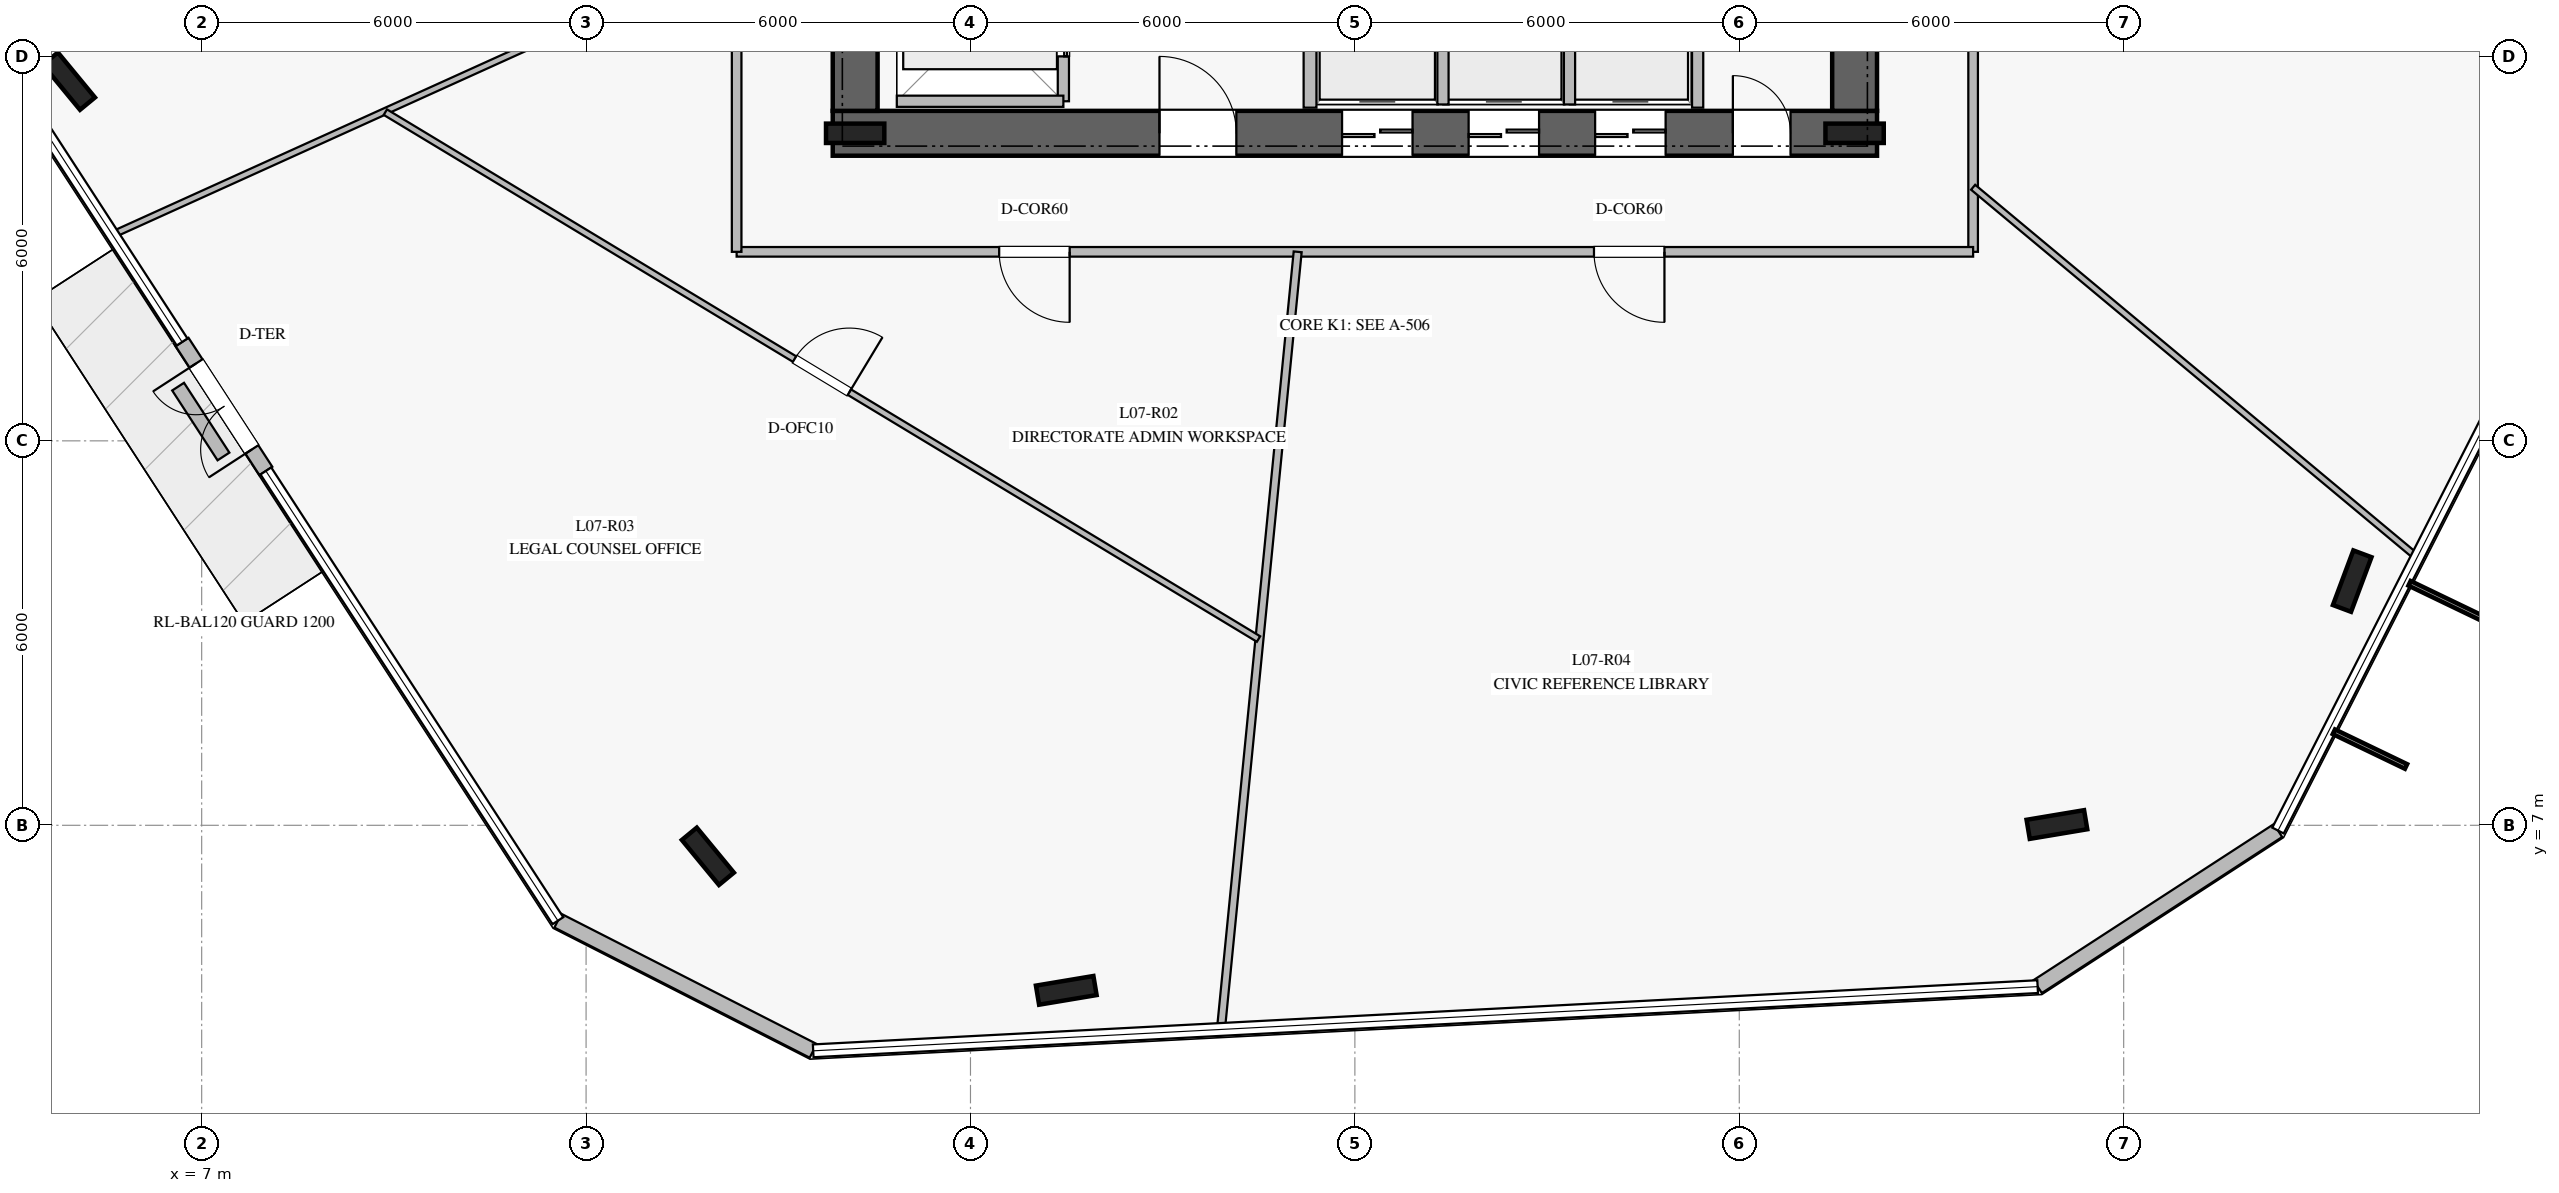
"""IFC4 building model, lengths in metres.
Left out: names, types, materials, properties, quantities, classifications, styles, units other than length and angle.
Written with IfcOpenShell. Run it as: python <this file> out.ifc"""

import sys

from ifc_helpers import new_model, si_unit, direction, frame, frame_2d, origin, origin_2d, place, context, subcontext, project, spatial, rectangle, i_section, extrude, element, fill, save


model = new_model("IFC4")
c1 = context("Model", 3, precision=1e-05, world=origin(), true_north=direction((0.0, 1.0)))
c2 = subcontext(c1, "Body", "Model", "MODEL_VIEW")
j1 = project(units=[si_unit("LENGTHUNIT", "METRE"), si_unit("PLANEANGLEUNIT", "RADIAN")], contexts=[c1])
p1 = place(None, origin())
s1 = spatial("IfcSite", under=j1, at=p1, CompositionType="ELEMENT")
p2 = place(p1, origin())
s2 = spatial("IfcBuilding", under=s1, at=p2, CompositionType="ELEMENT")
p3 = place(p2, frame((0.0, 0.0, 32.0)))
s3 = spatial("IfcBuildingStorey", under=s2, at=p3, CompositionType="ELEMENT", Elevation=32.0)
p4 = place(p3, frame((16.85, 17.8, 0.0), z_axis=(0.0, 0.0, 1.0), x_axis=(1.0, 0.0, 0.0)))
e1 = element("IfcWall", 1, at=p4, inside=s3, PredefinedType="SHEAR", context=c2, shape_type="SweptSolid", body=[
    extrude(rectangle(XDim=16.3, YDim=0.7, at=frame_2d((8.15, 0.0))), origin(), (0.0, 0.0, 1.0), 3.76),
])
p5 = place(p4, frame((5.1, 0.0, 0.0)))
e2 = element("IfcOpeningElement", 2, at=p5, cuts=e1, PredefinedType="OPENING", context=c2, shape_type="SweptSolid", body=[
    extrude(rectangle(XDim=1.2, YDim=2.25, at=frame_2d((0.6, 1.125))), frame((0.0, 0.36, 0.0), z_axis=(0.0, -1.0, 0.0), x_axis=(1.0, 0.0, 0.0)), (0.0, 0.0, 1.0), 0.72),
])
p6 = place(p4, frame((14.05, 0.0, 0.0)))
e3 = element("IfcOpeningElement", 3, at=p6, cuts=e1, PredefinedType="OPENING", context=c2, shape_type="SweptSolid", body=[
    extrude(rectangle(XDim=0.9, YDim=2.1, at=frame_2d((0.45, 1.05))), frame((0.0, 0.36, 0.0), z_axis=(0.0, -1.0, 0.0), x_axis=(1.0, 0.0, 0.0)), (0.0, 0.0, 1.0), 0.72),
])
p7 = place(p4, frame((7.95, 0.0, 0.0)))
e4 = element("IfcOpeningElement", 4, at=p7, cuts=e1, PredefinedType="OPENING", context=c2, shape_type="SweptSolid", body=[
    extrude(rectangle(XDim=1.1, YDim=2.2, at=frame_2d((0.55, 1.1))), frame((0.0, 0.36, 0.0), z_axis=(0.0, -1.0, 0.0), x_axis=(1.0, 0.0, 0.0)), (0.0, 0.0, 1.0), 0.72),
])
p8 = place(p4, frame((9.925, 0.0, 0.0)))
e5 = element("IfcOpeningElement", 5, at=p8, cuts=e1, PredefinedType="OPENING", context=c2, shape_type="SweptSolid", body=[
    extrude(rectangle(XDim=1.1, YDim=2.2, at=frame_2d((0.55, 1.1))), frame((0.0, 0.36, 0.0), z_axis=(0.0, -1.0, 0.0), x_axis=(1.0, 0.0, 0.0)), (0.0, 0.0, 1.0), 0.72),
])
p9 = place(p4, frame((11.9, 0.0, 0.0)))
e6 = element("IfcOpeningElement", 6, at=p9, cuts=e1, PredefinedType="OPENING", context=c2, shape_type="SweptSolid", body=[
    extrude(rectangle(XDim=1.1, YDim=2.2, at=frame_2d((0.55, 1.1))), frame((0.0, 0.36, 0.0), z_axis=(0.0, -1.0, 0.0), x_axis=(1.0, 0.0, 0.0)), (0.0, 0.0, 1.0), 0.72),
])
p10 = place(p3, frame((17.2, 31.85, 0.0), z_axis=(0.0, 0.0, 1.0), x_axis=(0.0, -1.0, 0.0)))
e7 = element("IfcWall", 7, at=p10, inside=s3, PredefinedType="SHEAR", context=c2, shape_type="SweptSolid", body=[
    extrude(rectangle(XDim=13.7, YDim=0.7, at=frame_2d((6.85, 0.0))), origin(), (0.0, 0.0, 1.0), 3.76),
])
p11 = place(p10, frame((2.0, 0.0, 0.0)))
e8 = element("IfcOpeningElement", 8, at=p11, cuts=e7, PredefinedType="OPENING", context=c2, shape_type="SweptSolid", body=[
    extrude(rectangle(XDim=1.5, YDim=2.2, at=frame_2d((0.75, 1.1))), frame((0.0, 0.36, 0.0), z_axis=(0.0, -1.0, 0.0), x_axis=(1.0, 0.0, 0.0)), (0.0, 0.0, 1.0), 0.72),
])
p12 = place(p3, frame((32.8, 18.15, 0.0), z_axis=(0.0, 0.0, 1.0), x_axis=(0.0, 1.0, 0.0)))
e9 = element("IfcWall", 9, at=p12, inside=s3, PredefinedType="SHEAR", context=c2, shape_type="SweptSolid", body=[
    extrude(rectangle(XDim=13.7, YDim=0.7, at=frame_2d((6.85, 0.0))), origin(), (0.0, 0.0, 1.0), 3.76),
])
for number, where, z_axis, x_axis in (
    (10, (17.2, 17.8, 0.0), (0.0, 0.0, 1.0), (1.0, 0.0, 0.0)),
    (11, (32.8, 17.8, 0.0), (0.0, 0.0, 1.0), (1.0, 0.0, 0.0)),
    (12, (4.928, 18.614, 0.0), (0.0, 0.0, 1.0), (-0.636, 0.772, 0.0)),
    (13, (14.901, 6.516, 0.0), (0.0, 0.0, 1.0), (-0.636, 0.772, 0.0)),
    (14, (20.495, 4.424, 0.0), (0.0, 0.0, 1.0), (0.986, 0.165, 0.0)),
    (15, (35.958, 7.012, 0.0), (0.0, 0.0, 1.0), (0.986, 0.165, 0.0)),
    (16, (40.567, 10.811, 0.0), (0.0, 0.0, 1.0), (0.35, 0.937, 0.0)),
):
    element("IfcColumn", number, at=place(p3, frame(where, z_axis=z_axis, x_axis=x_axis)), inside=s3, PredefinedType="COLUMN", context=c2, shape_type="SweptSolid", body=[
        extrude(i_section(OverallWidth=0.302, OverallDepth=0.91, WebThickness=0.021, FlangeThickness=0.04, at=origin_2d()), origin(), (0.0, 0.0, 1.0), 4.0),
    ])
p13 = place(p3, frame((6.694, 14.543, 0.0), z_axis=(0.0, 0.0, 1.0), x_axis=(0.54482747333, -0.838548164571, 0.0)))
e17 = element("IfcWall", 17, at=p13, inside=s3, PredefinedType="STANDARD", context=c2, shape_type="SweptSolid", body=[
    extrude(rectangle(XDim=2.4, YDim=0.24, at=frame_2d((1.2, 0.0))), origin(), (0.0, 0.0, 1.0), 3.76),
])
p14 = place(p13, frame((0.4, 0.0, 0.0)))
e18 = element("IfcOpeningElement", 18, at=p14, cuts=e17, PredefinedType="OPENING", context=c2, shape_type="SweptSolid", body=[
    extrude(rectangle(XDim=1.6, YDim=2.25, at=frame_2d((0.8, 1.125))), frame((0.0, 0.13, 0.0), z_axis=(0.0, -1.0, 0.0), x_axis=(1.0, 0.0, 0.0)), (0.0, 0.0, 1.0), 0.26),
])
p15 = place(p3, frame((12.56, 5.511, 0.0), z_axis=(0.0, 0.0, 1.0), x_axis=(0.89095075078, -0.454099944599, 0.0)))
e19 = element("IfcWall", 19, at=p15, inside=s3, PredefinedType="STANDARD", context=c2, shape_type="SweptSolid", body=[
    extrude(rectangle(XDim=4.473, YDim=0.24, at=frame_2d((2.236, 0.0))), origin(), (0.0, 0.0, 1.0), 3.76),
])
p16 = place(p3, frame((35.657, 4.482, 0.0), z_axis=(0.0, 0.0, 1.0), x_axis=(0.838722812153, 0.544558577542, 0.0)))
e20 = element("IfcWall", 20, at=p16, inside=s3, PredefinedType="STANDARD", context=c2, shape_type="SweptSolid", body=[
    extrude(rectangle(XDim=4.473, YDim=0.24, at=frame_2d((2.237, 0.0))), origin(), (0.0, 0.0, 1.0), 3.76),
])
p17 = place(p3, frame((6.632, 13.846, 0.0), z_axis=(0.0, 0.0, 1.0), x_axis=(0.544777038638, -0.8385809312, 0.0)))
e21 = element("IfcWall", 21, at=p17, inside=s3, PredefinedType="USERDEFINED", context=c2, shape_type="SweptSolid", body=[
    extrude(rectangle(XDim=1.3, YDim=0.22, at=frame_2d((0.65, 0.0))), origin(), (0.0, 0.0, 1.0), 0.4),
])
p18 = place(p3, frame((24.3, 18.2, 0.0), z_axis=(0.0, 0.0, 1.0), x_axis=(0.0, 1.0, 0.0)))
e22 = element("IfcWall", 22, at=p18, inside=s3, PredefinedType="PARTITIONING", context=c2, shape_type="SweptSolid", body=[
    extrude(rectangle(XDim=5.15, YDim=0.2, at=frame_2d((2.575, 0.0))), origin(), (0.0, 0.0, 1.0), 3.76),
])
p19 = place(p3, frame((30.35, 18.2, 0.0), z_axis=(0.0, 0.0, 1.0), x_axis=(0.0, 1.0, 0.0)))
e23 = element("IfcWall", 23, at=p19, inside=s3, PredefinedType="PARTITIONING", context=c2, shape_type="SweptSolid", body=[
    extrude(rectangle(XDim=3.48, YDim=0.175, at=frame_2d((1.74, 0.0))), origin(), (0.0, 0.0, 1.0), 3.76),
])
for number, where, z_axis, x_axis in (
    (24, (26.375, 18.25, 0.0), (0.0, 0.0, 1.0), (0.0, 1.0, 0.0)),
    (25, (28.35, 18.25, 0.0), (0.0, 0.0, 1.0), (0.0, 1.0, 0.0)),
):
    element("IfcWall", number, at=place(p3, frame(where, z_axis=z_axis, x_axis=x_axis)), inside=s3, PredefinedType="PARTITIONING", context=c2, shape_type="SweptSolid", body=[
        extrude(rectangle(XDim=2.35, YDim=0.175, at=frame_2d((1.175, 0.0))), origin(), (0.0, 0.0, 1.0), 3.76),
    ])
p20 = place(p3, frame((20.45, 18.3, 0.0), z_axis=(0.0, 0.0, 1.0), x_axis=(0.0, 1.0, 0.0)))
e26 = element("IfcWall", 26, at=p20, inside=s3, PredefinedType="PARTITIONING", context=c2, shape_type="SweptSolid", body=[
    extrude(rectangle(XDim=2.6, YDim=0.175, at=frame_2d((1.3, 0.0))), origin(), (0.0, 0.0, 1.0), 3.76),
])
p21 = place(p20, frame((0.7, 0.0, 0.0)))
e27 = element("IfcOpeningElement", 27, at=p21, cuts=e26, PredefinedType="OPENING", context=c2, shape_type="SweptSolid", body=[
    extrude(rectangle(XDim=1.2, YDim=2.2, at=frame_2d((0.6, 1.1))), frame((0.0, 0.098, 0.0), z_axis=(0.0, -1.0, 0.0), x_axis=(1.0, 0.0, 0.0)), (0.0, 0.0, 1.0), 0.195),
])
p22 = place(p3, frame((17.85, 18.3, 0.0), z_axis=(0.0, 0.0, 1.0), x_axis=(1.0, 0.0, 0.0)))
e28 = element("IfcWall", 28, at=p22, inside=s3, PredefinedType="PARTITIONING", context=c2, shape_type="SweptSolid", body=[
    extrude(rectangle(XDim=2.6, YDim=0.175, at=frame_2d((1.3, 0.0))), origin(), (0.0, 0.0, 1.0), 3.76),
])
p23 = place(p3, frame((34.65, 34.05, 0.0), z_axis=(0.0, 0.0, 1.0), x_axis=(0.0, -1.0, 0.0)))
e29 = element("IfcWall", 29, at=p23, inside=s3, PredefinedType="PARTITIONING", context=c2, shape_type="SweptSolid", body=[
    extrude(rectangle(XDim=18.1, YDim=0.15, at=frame_2d((9.05, 0.0))), origin(), (0.0, 0.0, 1.0), 3.21),
])
p24 = place(p23, frame((11.827, 0.0, 0.0)))
e30 = element("IfcOpeningElement", 30, at=p24, cuts=e29, PredefinedType="OPENING", context=c2, shape_type="SweptSolid", body=[
    extrude(rectangle(XDim=1.1, YDim=2.2, at=frame_2d((0.55, 1.1))), frame((0.0, 0.085, 0.0), z_axis=(0.0, -1.0, 0.0), x_axis=(1.0, 0.0, 0.0)), (0.0, 0.0, 1.0), 0.17),
])
p25 = place(p23, frame((3.34, 0.0, 0.0)))
e31 = element("IfcOpeningElement", 31, at=p25, cuts=e29, PredefinedType="OPENING", context=c2, shape_type="SweptSolid", body=[
    extrude(rectangle(XDim=1.1, YDim=2.2, at=frame_2d((0.55, 1.1))), frame((0.0, 0.085, 0.0), z_axis=(0.0, -1.0, 0.0), x_axis=(1.0, 0.0, 0.0)), (0.0, 0.0, 1.0), 0.17),
])
p26 = place(p3, frame((34.65, 15.95, 0.0), z_axis=(0.0, 0.0, 1.0), x_axis=(-1.0, 0.0, 0.0)))
e32 = element("IfcWall", 32, at=p26, inside=s3, PredefinedType="PARTITIONING", context=c2, shape_type="SweptSolid", body=[
    extrude(rectangle(XDim=19.3, YDim=0.15, at=frame_2d((9.65, 0.0))), origin(), (0.0, 0.0, 1.0), 3.21),
])
p27 = place(p26, frame((14.102, 0.0, 0.0)))
e33 = element("IfcOpeningElement", 33, at=p27, cuts=e32, PredefinedType="OPENING", context=c2, shape_type="SweptSolid", body=[
    extrude(rectangle(XDim=1.1, YDim=2.2, at=frame_2d((0.55, 1.1))), frame((0.0, 0.085, 0.0), z_axis=(0.0, -1.0, 0.0), x_axis=(1.0, 0.0, 0.0)), (0.0, 0.0, 1.0), 0.17),
])
p28 = place(p26, frame((4.818, 0.0, 0.0)))
e34 = element("IfcOpeningElement", 34, at=p28, cuts=e32, PredefinedType="OPENING", context=c2, shape_type="SweptSolid", body=[
    extrude(rectangle(XDim=1.1, YDim=2.2, at=frame_2d((0.55, 1.1))), frame((0.0, 0.085, 0.0), z_axis=(0.0, -1.0, 0.0), x_axis=(1.0, 0.0, 0.0)), (0.0, 0.0, 1.0), 0.17),
])
p29 = place(p3, frame((15.35, 15.95, 0.0), z_axis=(0.0, 0.0, 1.0), x_axis=(0.0, 1.0, 0.0)))
e35 = element("IfcWall", 35, at=p29, inside=s3, PredefinedType="PARTITIONING", context=c2, shape_type="SweptSolid", body=[
    extrude(rectangle(XDim=18.1, YDim=0.15, at=frame_2d((9.05, 0.0))), origin(), (0.0, 0.0, 1.0), 3.21),
])
p30 = place(p29, frame((8.687, 0.0, 0.0)))
e36 = element("IfcOpeningElement", 36, at=p30, cuts=e35, PredefinedType="OPENING", context=c2, shape_type="SweptSolid", body=[
    extrude(rectangle(XDim=1.1, YDim=2.2, at=frame_2d((0.55, 1.1))), frame((0.0, 0.085, 0.0), z_axis=(0.0, -1.0, 0.0), x_axis=(1.0, 0.0, 0.0)), (0.0, 0.0, 1.0), 0.17),
])
p31 = place(p3, frame((15.35, 20.629, 0.0), z_axis=(0.0, 0.0, 1.0), x_axis=(-0.910935697365, -0.412548367184, 0.0)))
e37 = element("IfcWall", 37, at=p31, inside=s3, PredefinedType="MOVABLE", context=c2, shape_type="SweptSolid", body=[
    extrude(rectangle(XDim=10.677, YDim=0.1, at=frame_2d((5.338, 0.0))), origin(), (0.0, 0.0, 1.0), 3.05),
])
p32 = place(p3, frame((24.107, 15.95, 0.0), z_axis=(0.0, 0.0, 1.0), x_axis=(-0.098223238164, -0.995164406259, 0.0)))
e38 = element("IfcWall", 38, at=p32, inside=s3, PredefinedType="PARTITIONING", context=c2, shape_type="SweptSolid", body=[
    extrude(rectangle(XDim=12.177, YDim=0.125, at=frame_2d((6.088, 0.0))), origin(), (0.0, 0.0, 1.0), 3.06),
])
p33 = place(p3, frame((34.65, 16.958, 0.0), z_axis=(0.0, 0.0, 1.0), x_axis=(0.76818127449, -0.640232402744, 0.0)))
e39 = element("IfcWall", 39, at=p33, inside=s3, PredefinedType="MOVABLE", context=c2, shape_type="SweptSolid", body=[
    extrude(rectangle(XDim=9.004, YDim=0.1, at=frame_2d((4.502, 0.0))), origin(), (0.0, 0.0, 1.0), 3.06),
])
p34 = place(p3, frame((9.867, 18.13, 0.0), z_axis=(0.0, 0.0, 1.0), x_axis=(0.856231759505, -0.516591883419, 0.0)))
e40 = element("IfcWall", 40, at=p34, inside=s3, PredefinedType="MOVABLE", context=c2, shape_type="SweptSolid", body=[
    extrude(rectangle(XDim=15.917, YDim=0.1, at=frame_2d((7.959, 0.0))), origin(), (0.0, 0.0, 1.0), 3.05),
])
p35 = place(p34, frame((7.459, 0.0, 0.0)))
e41 = element("IfcOpeningElement", 41, at=p35, cuts=e40, PredefinedType="OPENING", context=c2, shape_type="SweptSolid", body=[
    extrude(rectangle(XDim=1.0, YDim=2.15, at=frame_2d((0.5, 1.075))), frame((0.0, 0.06, 0.0), z_axis=(0.0, -1.0, 0.0), x_axis=(1.0, 0.0, 0.0)), (0.0, 0.0, 1.0), 0.12),
])
p36 = place(p14, frame((1.6, 0.0, 0.0), z_axis=(0.0, 0.0, 1.0), x_axis=(-1.0, 0.0, 0.0)))
e42 = element("IfcDoor", 42, at=p36, inside=s3, OperationType="DOUBLE_DOOR_SINGLE_SWING", PredefinedType="DOOR", context=c2, shape_type="SweptSolid", body=[
    extrude(rectangle(XDim=1.6, YDim=2.25, at=frame_2d((0.8, 1.125))), frame((0.0, 0.025, 0.0), z_axis=(0.0, -1.0, 0.0), x_axis=(1.0, 0.0, 0.0)), (0.0, 0.0, 1.0), 0.05),
])
fill(e18, e42)
p37 = place(p5, origin())
e43 = element("IfcDoor", 43, at=p37, inside=s3, OperationType="SINGLE_SWING_LEFT", PredefinedType="DOOR", context=c2, shape_type="SweptSolid", body=[
    extrude(rectangle(XDim=1.2, YDim=2.25, at=frame_2d((0.6, 1.125))), frame((0.0, 0.025, 0.0), z_axis=(0.0, -1.0, 0.0), x_axis=(1.0, 0.0, 0.0)), (0.0, 0.0, 1.0), 0.05),
])
fill(e2, e43)
p38 = place(p6, origin())
e44 = element("IfcDoor", 44, at=p38, inside=s3, OperationType="SINGLE_SWING_LEFT", PredefinedType="DOOR", context=c2, shape_type="SweptSolid", body=[
    extrude(rectangle(XDim=0.9, YDim=2.1, at=frame_2d((0.45, 1.05))), frame((0.0, 0.025, 0.0), z_axis=(0.0, -1.0, 0.0), x_axis=(1.0, 0.0, 0.0)), (0.0, 0.0, 1.0), 0.05),
])
fill(e3, e44)
p39 = place(p7, origin())
e45 = element("IfcDoor", 45, at=p39, inside=s3, OperationType="DOUBLE_DOOR_SLIDING", PredefinedType="DOOR", context=c2, shape_type="SweptSolid", body=[
    extrude(rectangle(XDim=1.1, YDim=2.2, at=frame_2d((0.55, 1.1))), frame((0.0, 0.025, 0.0), z_axis=(0.0, -1.0, 0.0), x_axis=(1.0, 0.0, 0.0)), (0.0, 0.0, 1.0), 0.05),
])
fill(e4, e45)
p40 = place(p8, origin())
e46 = element("IfcDoor", 46, at=p40, inside=s3, OperationType="DOUBLE_DOOR_SLIDING", PredefinedType="DOOR", context=c2, shape_type="SweptSolid", body=[
    extrude(rectangle(XDim=1.1, YDim=2.2, at=frame_2d((0.55, 1.1))), frame((0.0, 0.025, 0.0), z_axis=(0.0, -1.0, 0.0), x_axis=(1.0, 0.0, 0.0)), (0.0, 0.0, 1.0), 0.05),
])
fill(e5, e46)
p41 = place(p9, origin())
e47 = element("IfcDoor", 47, at=p41, inside=s3, OperationType="DOUBLE_DOOR_SLIDING", PredefinedType="DOOR", context=c2, shape_type="SweptSolid", body=[
    extrude(rectangle(XDim=1.1, YDim=2.2, at=frame_2d((0.55, 1.1))), frame((0.0, 0.025, 0.0), z_axis=(0.0, -1.0, 0.0), x_axis=(1.0, 0.0, 0.0)), (0.0, 0.0, 1.0), 0.05),
])
fill(e6, e47)
p42 = place(p21, origin())
e48 = element("IfcDoor", 48, at=p42, inside=s3, OperationType="DOUBLE_DOOR_SLIDING", PredefinedType="DOOR", context=c2, shape_type="SweptSolid", body=[
    extrude(rectangle(XDim=1.2, YDim=2.2, at=frame_2d((0.6, 1.1))), frame((0.0, 0.025, 0.0), z_axis=(0.0, -1.0, 0.0), x_axis=(1.0, 0.0, 0.0)), (0.0, 0.0, 1.0), 0.05),
])
fill(e27, e48)
p43 = place(p27, origin())
e49 = element("IfcDoor", 49, at=p43, inside=s3, OperationType="SINGLE_SWING_LEFT", PredefinedType="DOOR", context=c2, shape_type="SweptSolid", body=[
    extrude(rectangle(XDim=1.1, YDim=2.2, at=frame_2d((0.55, 1.1))), frame((0.0, 0.025, 0.0), z_axis=(0.0, -1.0, 0.0), x_axis=(1.0, 0.0, 0.0)), (0.0, 0.0, 1.0), 0.05),
])
fill(e33, e49)
p44 = place(p35, origin())
e50 = element("IfcDoor", 50, at=p44, inside=s3, OperationType="SINGLE_SWING_RIGHT", PredefinedType="DOOR", context=c2, shape_type="SweptSolid", body=[
    extrude(rectangle(XDim=1.0, YDim=2.15, at=frame_2d((0.5, 1.075))), frame((0.0, 0.025, 0.0), z_axis=(0.0, -1.0, 0.0), x_axis=(1.0, 0.0, 0.0)), (0.0, 0.0, 1.0), 0.05),
])
fill(e41, e50)
p45 = place(p28, origin())
e51 = element("IfcDoor", 51, at=p45, inside=s3, OperationType="SINGLE_SWING_LEFT", PredefinedType="DOOR", context=c2, shape_type="SweptSolid", body=[
    extrude(rectangle(XDim=1.1, YDim=2.2, at=frame_2d((0.55, 1.1))), frame((0.0, 0.025, 0.0), z_axis=(0.0, -1.0, 0.0), x_axis=(1.0, 0.0, 0.0)), (0.0, 0.0, 1.0), 0.05),
])
fill(e34, e51)
save(model, sys.argv[1])
